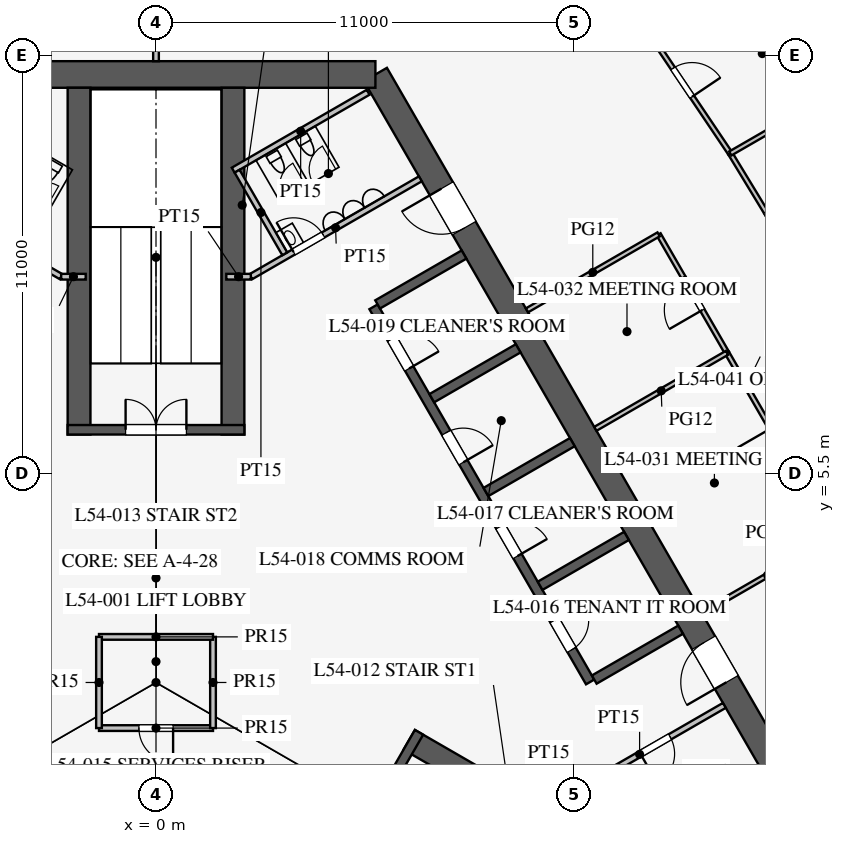
"""IFC4 building model, lengths in metres.
Left out: names, types, materials, properties, quantities, classifications, styles, units other than length and angle.
Written with IfcOpenShell. Run it as: python <this file> out.ifc"""

import sys

from ifc_helpers import new_model, si_unit, direction, frame, frame_2d, origin, place, context, subcontext, project, spatial, rectangle, extrude, element, fill, save


model = new_model("IFC4")
c1 = context("Model", 3, precision=1e-05, world=origin(), true_north=direction((0.0, 1.0)))
c2 = subcontext(c1, "Body", "Model", "MODEL_VIEW")
j1 = project(units=[si_unit("LENGTHUNIT", "METRE"), si_unit("PLANEANGLEUNIT", "RADIAN")], contexts=[c1])
p1 = place(None, origin())
s1 = spatial("IfcSite", under=j1, at=p1, CompositionType="ELEMENT")
p2 = place(p1, origin())
s2 = spatial("IfcBuilding", under=s1, at=p2, CompositionType="ELEMENT")
p3 = place(p2, frame((0.0, 0.0, 235.9)))
s3 = spatial("IfcBuildingStorey", under=s2, at=p3, CompositionType="ELEMENT", Elevation=235.9)
p4 = place(p3, frame((16.743, -3.0, 0.0), z_axis=(0.0, 0.0, 1.0), x_axis=(-0.500002442456, 0.866023993627, 0.0)))
e1 = element("IfcWall", 1, at=p4, inside=s3, PredefinedType="SHEAR", context=c2, shape_type="SweptSolid", body=[
    extrude(rectangle(XDim=21.939, YDim=0.7, at=frame_2d((10.97, 0.0))), origin(), (0.0, 0.0, 1.0), 4.2),
])
p5 = place(p4, frame((17.27, 0.0, 0.0)))
e2 = element("IfcOpeningElement", 2, at=p5, cuts=e1, PredefinedType="OPENING", context=c2, shape_type="SweptSolid", body=[
    extrude(rectangle(XDim=1.2, YDim=2.1, at=frame_2d((0.6, 1.05))), frame((0.0, 0.36, 0.0), z_axis=(0.0, -1.0, 0.0), x_axis=(1.0, 0.0, 0.0)), (0.0, 0.0, 1.0), 0.72),
])
p6 = place(p4, frame((3.47, 0.0, 0.0)))
e3 = element("IfcOpeningElement", 3, at=p6, cuts=e1, PredefinedType="OPENING", context=c2, shape_type="SweptSolid", body=[
    extrude(rectangle(XDim=1.2, YDim=2.1, at=frame_2d((0.6, 1.05))), frame((0.0, 0.36, 0.0), z_axis=(0.0, -1.0, 0.0), x_axis=(1.0, 0.0, 0.0)), (0.0, 0.0, 1.0), 0.72),
])
p7 = place(p3, frame((5.773, 16.0, 0.0), z_axis=(0.0, 0.0, 1.0), x_axis=(-1.0, 0.0, 0.0)))
e4 = element("IfcWall", 4, at=p7, inside=s3, PredefinedType="SHEAR", context=c2, shape_type="SweptSolid", body=[
    extrude(rectangle(XDim=11.547, YDim=0.7, at=frame_2d((5.773, 0.0))), origin(), (0.0, 0.0, 1.0), 4.2),
])
p8 = place(p3, frame((11.424, 0.014, 0.0), z_axis=(0.0, 0.0, 1.0), x_axis=(-0.500001763848, 0.866024385424, 0.0)))
e5 = element("IfcWall", 5, at=p8, inside=s3, PredefinedType="SHEAR", context=c2, shape_type="SweptSolid", body=[
    extrude(rectangle(XDim=11.4, YDim=0.25, at=frame_2d((5.7, 0.0))), origin(), (0.0, 0.0, 1.0), 4.2),
])
p9 = place(p8, frame((0.975, 0.0, 0.0)))
e6 = element("IfcOpeningElement", 6, at=p9, cuts=e5, PredefinedType="OPENING", context=c2, shape_type="SweptSolid", body=[
    extrude(rectangle(XDim=0.9, YDim=2.1, at=frame_2d((0.45, 1.05))), frame((0.0, 0.135, 0.0), z_axis=(0.0, -1.0, 0.0), x_axis=(1.0, 0.0, 0.0)), (0.0, 0.0, 1.0), 0.27),
])
p10 = place(p8, frame((3.825, 0.0, 0.0)))
e7 = element("IfcOpeningElement", 7, at=p10, cuts=e5, PredefinedType="OPENING", context=c2, shape_type="SweptSolid", body=[
    extrude(rectangle(XDim=0.9, YDim=2.1, at=frame_2d((0.45, 1.05))), frame((0.0, 0.135, 0.0), z_axis=(0.0, -1.0, 0.0), x_axis=(1.0, 0.0, 0.0)), (0.0, 0.0, 1.0), 0.27),
])
p11 = place(p8, frame((6.675, 0.0, 0.0)))
e8 = element("IfcOpeningElement", 8, at=p11, cuts=e5, PredefinedType="OPENING", context=c2, shape_type="SweptSolid", body=[
    extrude(rectangle(XDim=0.9, YDim=2.1, at=frame_2d((0.45, 1.05))), frame((0.0, 0.135, 0.0), z_axis=(0.0, -1.0, 0.0), x_axis=(1.0, 0.0, 0.0)), (0.0, 0.0, 1.0), 0.27),
])
p12 = place(p8, frame((9.525, 0.0, 0.0)))
e9 = element("IfcOpeningElement", 9, at=p12, cuts=e5, PredefinedType="OPENING", context=c2, shape_type="SweptSolid", body=[
    extrude(rectangle(XDim=0.9, YDim=2.1, at=frame_2d((0.45, 1.05))), frame((0.0, 0.135, 0.0), z_axis=(0.0, -1.0, 0.0), x_axis=(1.0, 0.0, 0.0)), (0.0, 0.0, 1.0), 0.27),
])
for number, where, z_axis, x_axis in (
    (10, (11.532, 0.076, 0.0), (0.0, 0.0, 1.0), (0.866, 0.5, 0.0)),
    (11, (10.107, 2.544, 0.0), (0.0, 0.0, 1.0), (0.866, 0.5, 0.0)),
    (12, (8.682, 5.012, 0.0), (0.0, 0.0, 1.0), (0.866, 0.5, 0.0)),
    (13, (7.257, 7.481, 0.0), (0.0, 0.0, 1.0), (0.866, 0.5, 0.0)),
    (14, (5.832, 9.949, 0.0), (0.0, 0.0, 1.0), (0.866, 0.5, 0.0)),
):
    element("IfcWall", number, at=place(p3, frame(where, z_axis=z_axis, x_axis=x_axis)), inside=s3, PredefinedType="SHEAR", context=c2, shape_type="SweptSolid", body=[
        extrude(rectangle(XDim=2.625, YDim=0.25, at=frame_2d((1.312, 0.0))), origin(), (0.0, 0.0, 1.0), 4.2),
    ])
p13 = place(p3, frame((6.663, -1.509, 0.0), z_axis=(0.0, 0.0, 1.0), x_axis=(0.866028310072, -0.499994966129, 0.0)))
e15 = element("IfcWall", 15, at=p13, inside=s3, PredefinedType="SHEAR", context=c2, shape_type="SweptSolid", body=[
    extrude(rectangle(XDim=9.125, YDim=0.6, at=frame_2d((4.562, 0.0))), origin(), (0.0, 0.0, 1.0), 4.2),
])
p14 = place(p3, frame((4.597, -5.339, 0.0), z_axis=(0.0, 0.0, 1.0), x_axis=(0.499984536904, 0.866034331223, 0.0)))
e16 = element("IfcWall", 16, at=p14, inside=s3, PredefinedType="SHEAR", context=c2, shape_type="SweptSolid", body=[
    extrude(rectangle(XDim=4.65, YDim=0.25, at=frame_2d((2.325, 0.0))), origin(), (0.0, 0.0, 1.0), 4.2),
])
p15 = place(p14, frame((1.525, 0.0, 0.0)))
e17 = element("IfcOpeningElement", 17, at=p15, cuts=e16, PredefinedType="OPENING", context=c2, shape_type="SweptSolid", body=[
    extrude(rectangle(XDim=1.6, YDim=2.1, at=frame_2d((0.8, 1.05))), frame((0.0, 0.135, 0.0), z_axis=(0.0, -1.0, 0.0), x_axis=(1.0, 0.0, 0.0)), (0.0, 0.0, 1.0), 0.27),
])
for number, where, z_axis, x_axis in (
    (18, (2.025, 6.525, 0.0), (0.0, 0.0, 1.0), (0.0, 1.0, 0.0)),
    (19, (-2.025, 6.525, 0.0), (0.0, 0.0, 1.0), (0.0, 1.0, 0.0)),
):
    element("IfcWall", number, at=place(p3, frame(where, z_axis=z_axis, x_axis=x_axis)), inside=s3, PredefinedType="SHEAR", context=c2, shape_type="SweptSolid", body=[
        extrude(rectangle(XDim=9.125, YDim=0.6, at=frame_2d((4.562, 0.0))), origin(), (0.0, 0.0, 1.0), 4.2),
    ])
p16 = place(p3, frame((2.325, 6.65, 0.0), z_axis=(0.0, 0.0, 1.0), x_axis=(-1.0, 0.0, 0.0)))
e20 = element("IfcWall", 20, at=p16, inside=s3, PredefinedType="SHEAR", context=c2, shape_type="SweptSolid", body=[
    extrude(rectangle(XDim=4.65, YDim=0.25, at=frame_2d((2.325, 0.0))), origin(), (0.0, 0.0, 1.0), 4.2),
])
p17 = place(p16, frame((1.525, 0.0, 0.0)))
e21 = element("IfcOpeningElement", 21, at=p17, cuts=e20, PredefinedType="OPENING", context=c2, shape_type="SweptSolid", body=[
    extrude(rectangle(XDim=1.6, YDim=2.1, at=frame_2d((0.8, 1.05))), frame((0.0, 0.135, 0.0), z_axis=(0.0, -1.0, 0.0), x_axis=(1.0, 0.0, 0.0)), (0.0, 0.0, 1.0), 0.27),
])
p18 = place(p3, frame((2.495, 10.678, 0.0), z_axis=(0.0, 0.0, 1.0), x_axis=(0.866037967349, 0.499978238636, 0.0)))
e22 = element("IfcWall", 22, at=p18, inside=s3, PredefinedType="PARTITIONING", context=c2, shape_type="SweptSolid", body=[
    extrude(rectangle(XDim=5.15, YDim=0.15, at=frame_2d((2.575, 0.0))), origin(), (0.0, 0.0, 1.0), 4.0),
])
p19 = place(p18, frame((1.3, 0.0, 0.0)))
e23 = element("IfcOpeningElement", 23, at=p19, cuts=e22, PredefinedType="OPENING", context=c2, shape_type="SweptSolid", body=[
    extrude(rectangle(XDim=0.9, YDim=2.1, at=frame_2d((0.45, 1.05))), frame((0.0, 0.085, 0.0), z_axis=(0.0, -1.0, 0.0), x_axis=(1.0, 0.0, 0.0)), (0.0, 0.0, 1.0), 0.17),
])
p20 = place(p3, frame((10.495, -3.178, 0.0), z_axis=(0.0, 0.0, 1.0), x_axis=(0.866037967349, 0.499978238636, 0.0)))
e24 = element("IfcWall", 24, at=p20, inside=s3, PredefinedType="PARTITIONING", context=c2, shape_type="SweptSolid", body=[
    extrude(rectangle(XDim=5.15, YDim=0.15, at=frame_2d((2.575, 0.0))), origin(), (0.0, 0.0, 1.0), 4.0),
])
p21 = place(p20, frame((2.6, 0.0, 0.0)))
e25 = element("IfcOpeningElement", 25, at=p21, cuts=e24, PredefinedType="OPENING", context=c2, shape_type="SweptSolid", body=[
    extrude(rectangle(XDim=0.9, YDim=2.1, at=frame_2d((0.45, 1.05))), frame((0.0, 0.085, 0.0), z_axis=(0.0, -1.0, 0.0), x_axis=(1.0, 0.0, 0.0)), (0.0, 0.0, 1.0), 0.17),
])
p22 = place(p3, frame((-2.495, 10.678, 0.0), z_axis=(0.0, 0.0, 1.0), x_axis=(-0.866037967349, 0.499978238636, 0.0)))
e26 = element("IfcWall", 26, at=p22, inside=s3, PredefinedType="PARTITIONING", context=c2, shape_type="SweptSolid", body=[
    extrude(rectangle(XDim=5.15, YDim=0.15, at=frame_2d((2.575, 0.0))), origin(), (0.0, 0.0, 1.0), 4.0),
])
p23 = place(p22, frame((2.6, 0.0, 0.0)))
e27 = element("IfcOpeningElement", 27, at=p23, cuts=e26, PredefinedType="OPENING", context=c2, shape_type="SweptSolid", body=[
    extrude(rectangle(XDim=0.9, YDim=2.1, at=frame_2d((0.45, 1.05))), frame((0.0, 0.085, 0.0), z_axis=(0.0, -1.0, 0.0), x_axis=(1.0, 0.0, 0.0)), (0.0, 0.0, 1.0), 0.17),
])
for number, where, z_axis, x_axis in (
    (28, (2.495, 10.678, 0.0), (0.0, 0.0, 1.0), (-1.0, 0.0, 0.0)),
    (29, (-2.495, 10.678, 0.0), (0.0, 0.0, 1.0), (1.0, 0.0, 0.0)),
):
    element("IfcWall", number, at=place(p3, frame(where, z_axis=z_axis, x_axis=x_axis)), inside=s3, PredefinedType="PARTITIONING", context=c2, shape_type="SweptSolid", body=[
        extrude(rectangle(XDim=0.645, YDim=0.15, at=frame_2d((0.323, 0.0))), origin(), (0.0, 0.0, 1.0), 4.0),
    ])
p24 = place(p3, frame((2.031, 13.482, 0.0), z_axis=(0.0, 0.0, 1.0), x_axis=(0.866050731258, 0.499956128963, 0.0)))
e30 = element("IfcWall", 30, at=p24, inside=s3, PredefinedType="PARTITIONING", context=c2, shape_type="SweptSolid", body=[
    extrude(rectangle(XDim=4.1, YDim=0.15, at=frame_2d((2.05, 0.0))), origin(), (0.0, 0.0, 1.0), 4.0),
])
p25 = place(p3, frame((3.389, 11.281, 0.0), z_axis=(0.0, 0.0, 1.0), x_axis=(-0.499989096993, 0.866031698547, 0.0)))
e31 = element("IfcWall", 31, at=p25, inside=s3, PredefinedType="PARTITIONING", context=c2, shape_type="SweptSolid", body=[
    extrude(rectangle(XDim=2.51, YDim=0.15, at=frame_2d((1.255, 0.0))), origin(), (0.0, 0.0, 1.0), 4.0),
])
p26 = place(p3, frame((-1.5, -1.2, 0.0), z_axis=(0.0, 0.0, 1.0), x_axis=(1.0, 0.0, 0.0)))
e32 = element("IfcWall", 32, at=p26, inside=s3, PredefinedType="PARTITIONING", context=c2, shape_type="SweptSolid", body=[
    extrude(rectangle(XDim=3.0, YDim=0.15, at=frame_2d((1.5, 0.0))), origin(), (0.0, 0.0, 1.0), 4.0),
])
p27 = place(p26, frame((1.05, 0.0, 0.0)))
e33 = element("IfcOpeningElement", 33, at=p27, cuts=e32, PredefinedType="OPENING", context=c2, shape_type="SweptSolid", body=[
    extrude(rectangle(XDim=0.9, YDim=2.1, at=frame_2d((0.45, 1.05))), frame((0.0, 0.085, 0.0), z_axis=(0.0, -1.0, 0.0), x_axis=(1.0, 0.0, 0.0)), (0.0, 0.0, 1.0), 0.17),
])
p28 = place(p3, frame((1.5, -1.2, 0.0), z_axis=(0.0, 0.0, 1.0), x_axis=(0.0, 1.0, 0.0)))
e34 = element("IfcWall", 34, at=p28, inside=s3, PredefinedType="PARTITIONING", context=c2, shape_type="SweptSolid", body=[
    extrude(rectangle(XDim=2.4, YDim=0.15, at=frame_2d((1.2, 0.0))), origin(), (0.0, 0.0, 1.0), 4.0),
])
p29 = place(p3, frame((1.5, 1.2, 0.0), z_axis=(0.0, 0.0, 1.0), x_axis=(-1.0, 0.0, 0.0)))
e35 = element("IfcWall", 35, at=p29, inside=s3, PredefinedType="PARTITIONING", context=c2, shape_type="SweptSolid", body=[
    extrude(rectangle(XDim=3.0, YDim=0.15, at=frame_2d((1.5, 0.0))), origin(), (0.0, 0.0, 1.0), 4.0),
])
p30 = place(p3, frame((-1.5, 1.2, 0.0), z_axis=(0.0, 0.0, 1.0), x_axis=(0.0, -1.0, 0.0)))
e36 = element("IfcWall", 36, at=p30, inside=s3, PredefinedType="PARTITIONING", context=c2, shape_type="SweptSolid", body=[
    extrude(rectangle(XDim=2.4, YDim=0.15, at=frame_2d((1.2, 0.0))), origin(), (0.0, 0.0, 1.0), 4.0),
])
p31 = place(p3, frame((0.0, 16.35, 0.0), z_axis=(0.0, 0.0, 1.0), x_axis=(0.0, 1.0, 0.0)))
e37 = element("IfcWall", 37, at=p31, inside=s3, PredefinedType="PARTITIONING", context=c2, shape_type="SweptSolid", body=[
    extrude(rectangle(XDim=15.0, YDim=0.15, at=frame_2d((7.5, 0.0))), origin(), (0.0, 0.0, 1.0), 2.4),
])
p32 = place(p3, frame((15.026, 8.675, 0.0), z_axis=(0.0, 0.0, 1.0), x_axis=(-0.500012057535, 0.866018442252, 0.0)))
e38 = element("IfcWall", 38, at=p32, inside=s3, PredefinedType="PARTITIONING", context=c2, shape_type="SweptSolid", body=[
    extrude(rectangle(XDim=3.6, YDim=0.12, at=frame_2d((1.8, 0.0))), origin(), (0.0, 0.0, 1.0), 2.9),
])
p33 = place(p32, frame((1.3, 0.0, 0.15)))
e39 = element("IfcOpeningElement", 39, at=p33, cuts=e38, PredefinedType="OPENING", context=c2, shape_type="SweptSolid", body=[
    extrude(rectangle(XDim=1.0, YDim=2.1, at=frame_2d((0.5, 1.05))), frame((0.0, 0.07, 0.0), z_axis=(0.0, -1.0, 0.0), x_axis=(1.0, 0.0, 0.0)), (0.0, 0.0, 1.0), 0.14),
])
p34 = place(p3, frame((17.825, 3.825, 0.0), z_axis=(0.0, 0.0, 1.0), x_axis=(-0.499965239061, 0.866045472092, 0.0)))
e40 = element("IfcWall", 40, at=p34, inside=s3, PredefinedType="PARTITIONING", context=c2, shape_type="SweptSolid", body=[
    extrude(rectangle(XDim=5.6, YDim=0.12, at=frame_2d((2.8, 0.0))), origin(), (0.0, 0.0, 1.0), 2.9),
])
p35 = place(p34, frame((2.3, 0.0, 0.15)))
e41 = element("IfcOpeningElement", 41, at=p35, cuts=e40, PredefinedType="OPENING", context=c2, shape_type="SweptSolid", body=[
    extrude(rectangle(XDim=1.0, YDim=2.1, at=frame_2d((0.5, 1.05))), frame((0.0, 0.07, 0.0), z_axis=(0.0, -1.0, 0.0), x_axis=(1.0, 0.0, 0.0)), (0.0, 0.0, 1.0), 0.14),
])
for number, where, z_axis, x_axis in (
    (42, (9.761, 9.793, 0.0), (0.0, 0.0, 1.0), (0.866, 0.5, 0.0)),
    (43, (11.562, 6.675, 0.0), (0.0, 0.0, 1.0), (0.866, 0.5, 0.0)),
    (44, (14.361, 1.825, 0.0), (0.0, 0.0, 1.0), (0.866, 0.5, 0.0)),
):
    element("IfcWall", number, at=place(p3, frame(where, z_axis=z_axis, x_axis=x_axis)), inside=s3, PredefinedType="PARTITIONING", context=c2, shape_type="SweptSolid", body=[
        extrude(rectangle(XDim=4.0, YDim=0.12, at=frame_2d((2.0, 0.0))), origin(), (0.0, 0.0, 1.0), 2.9),
    ])
p36 = place(p3, frame((17.451, 10.075, 0.0), z_axis=(0.0, 0.0, 1.0), x_axis=(-0.519790350351, 0.85429385558, 0.0)))
e45 = element("IfcWall", 45, at=p36, inside=s3, PredefinedType="PARTITIONING", context=c2, shape_type="SweptSolid", body=[
    extrude(rectangle(XDim=4.501, YDim=0.12, at=frame_2d((2.25, 0.0))), origin(), (0.0, 0.0, 1.0), 2.9),
])
p37 = place(p36, frame((1.8, 0.0, 0.15)))
e46 = element("IfcOpeningElement", 46, at=p37, cuts=e45, PredefinedType="OPENING", context=c2, shape_type="SweptSolid", body=[
    extrude(rectangle(XDim=0.9, YDim=2.1, at=frame_2d((0.45, 1.05))), frame((0.0, 0.07, 0.0), z_axis=(0.0, -1.0, 0.0), x_axis=(1.0, 0.0, 0.0)), (0.0, 0.0, 1.0), 0.14),
])
p38 = place(p3, frame((15.111, 13.921, 0.0), z_axis=(0.0, 0.0, 1.0), x_axis=(-0.558466624917, 0.829526991034, 0.0)))
e47 = element("IfcWall", 47, at=p38, inside=s3, PredefinedType="PARTITIONING", context=c2, shape_type="SweptSolid", body=[
    extrude(rectangle(XDim=4.511, YDim=0.12, at=frame_2d((2.255, 0.0))), origin(), (0.0, 0.0, 1.0), 2.9),
])
p39 = place(p38, frame((1.8, 0.0, 0.15)))
e48 = element("IfcOpeningElement", 48, at=p39, cuts=e47, PredefinedType="OPENING", context=c2, shape_type="SweptSolid", body=[
    extrude(rectangle(XDim=0.9, YDim=2.1, at=frame_2d((0.45, 1.05))), frame((0.0, 0.07, 0.0), z_axis=(0.0, -1.0, 0.0), x_axis=(1.0, 0.0, 0.0)), (0.0, 0.0, 1.0), 0.14),
])
p40 = place(p3, frame((15.111, 13.921, 0.0), z_axis=(0.0, 0.0, 1.0), x_axis=(0.866032721818, 0.499987324581, 0.0)))
e49 = element("IfcWall", 49, at=p40, inside=s3, PredefinedType="PARTITIONING", context=c2, shape_type="SweptSolid", body=[
    extrude(rectangle(XDim=3.644, YDim=0.12, at=frame_2d((1.822, 0.0))), origin(), (0.0, 0.0, 1.0), 2.9),
])
p41 = place(p19, origin())
e50 = element("IfcDoor", 50, at=p41, inside=s3, OperationType="SINGLE_SWING_LEFT", PredefinedType="DOOR", context=c2, shape_type="SweptSolid", body=[
    extrude(rectangle(XDim=0.9, YDim=2.1, at=frame_2d((0.45, 1.05))), frame((0.0, 0.025, 0.0), z_axis=(0.0, -1.0, 0.0), x_axis=(1.0, 0.0, 0.0)), (0.0, 0.0, 1.0), 0.05),
])
fill(e23, e50)
p42 = place(p21, frame((0.9, 0.0, 0.0), z_axis=(0.0, 0.0, 1.0), x_axis=(-1.0, 0.0, 0.0)))
e51 = element("IfcDoor", 51, at=p42, inside=s3, OperationType="SINGLE_SWING_RIGHT", PredefinedType="DOOR", context=c2, shape_type="SweptSolid", body=[
    extrude(rectangle(XDim=0.9, YDim=2.1, at=frame_2d((0.45, 1.05))), frame((0.0, 0.025, 0.0), z_axis=(0.0, -1.0, 0.0), x_axis=(1.0, 0.0, 0.0)), (0.0, 0.0, 1.0), 0.05),
])
fill(e25, e51)
p43 = place(p27, frame((0.9, 0.0, 0.0), z_axis=(0.0, 0.0, 1.0), x_axis=(-1.0, 0.0, 0.0)))
e52 = element("IfcDoor", 52, at=p43, inside=s3, OperationType="SINGLE_SWING_LEFT", PredefinedType="DOOR", context=c2, shape_type="SweptSolid", body=[
    extrude(rectangle(XDim=0.9, YDim=2.1, at=frame_2d((0.45, 1.05))), frame((0.0, 0.025, 0.0), z_axis=(0.0, -1.0, 0.0), x_axis=(1.0, 0.0, 0.0)), (0.0, 0.0, 1.0), 0.05),
])
fill(e33, e52)
p44 = place(p17, frame((1.6, 0.0, 0.0), z_axis=(0.0, 0.0, 1.0), x_axis=(-1.0, 0.0, 0.0)))
e53 = element("IfcDoor", 53, at=p44, inside=s3, OperationType="DOUBLE_DOOR_SINGLE_SWING", PredefinedType="DOOR", context=c2, shape_type="SweptSolid", body=[
    extrude(rectangle(XDim=1.6, YDim=2.1, at=frame_2d((0.8, 1.05))), frame((0.0, 0.025, 0.0), z_axis=(0.0, -1.0, 0.0), x_axis=(1.0, 0.0, 0.0)), (0.0, 0.0, 1.0), 0.05),
])
fill(e21, e53)
p45 = place(p5, origin())
e54 = element("IfcDoor", 54, at=p45, inside=s3, OperationType="SINGLE_SWING_RIGHT", PredefinedType="DOOR", context=c2, shape_type="SweptSolid", body=[
    extrude(rectangle(XDim=1.2, YDim=2.1, at=frame_2d((0.6, 1.05))), frame((0.0, 0.025, 0.0), z_axis=(0.0, -1.0, 0.0), x_axis=(1.0, 0.0, 0.0)), (0.0, 0.0, 1.0), 0.05),
])
fill(e2, e54)
p46 = place(p6, origin())
e55 = element("IfcDoor", 55, at=p46, inside=s3, OperationType="SINGLE_SWING_LEFT", PredefinedType="DOOR", context=c2, shape_type="SweptSolid", body=[
    extrude(rectangle(XDim=1.2, YDim=2.1, at=frame_2d((0.6, 1.05))), frame((0.0, 0.025, 0.0), z_axis=(0.0, -1.0, 0.0), x_axis=(1.0, 0.0, 0.0)), (0.0, 0.0, 1.0), 0.05),
])
fill(e3, e55)
p47 = place(p9, frame((0.9, 0.0, 0.0), z_axis=(0.0, 0.0, 1.0), x_axis=(-1.0, 0.0, 0.0)))
e56 = element("IfcDoor", 56, at=p47, inside=s3, OperationType="SINGLE_SWING_LEFT", PredefinedType="DOOR", context=c2, shape_type="SweptSolid", body=[
    extrude(rectangle(XDim=0.9, YDim=2.1, at=frame_2d((0.45, 1.05))), frame((0.0, 0.025, 0.0), z_axis=(0.0, -1.0, 0.0), x_axis=(1.0, 0.0, 0.0)), (0.0, 0.0, 1.0), 0.05),
])
fill(e6, e56)
p48 = place(p10, frame((0.9, 0.0, 0.0), z_axis=(0.0, 0.0, 1.0), x_axis=(-1.0, 0.0, 0.0)))
e57 = element("IfcDoor", 57, at=p48, inside=s3, OperationType="SINGLE_SWING_RIGHT", PredefinedType="DOOR", context=c2, shape_type="SweptSolid", body=[
    extrude(rectangle(XDim=0.9, YDim=2.1, at=frame_2d((0.45, 1.05))), frame((0.0, 0.025, 0.0), z_axis=(0.0, -1.0, 0.0), x_axis=(1.0, 0.0, 0.0)), (0.0, 0.0, 1.0), 0.05),
])
fill(e7, e57)
p49 = place(p11, frame((0.9, 0.0, 0.0), z_axis=(0.0, 0.0, 1.0), x_axis=(-1.0, 0.0, 0.0)))
e58 = element("IfcDoor", 58, at=p49, inside=s3, OperationType="SINGLE_SWING_RIGHT", PredefinedType="DOOR", context=c2, shape_type="SweptSolid", body=[
    extrude(rectangle(XDim=0.9, YDim=2.1, at=frame_2d((0.45, 1.05))), frame((0.0, 0.025, 0.0), z_axis=(0.0, -1.0, 0.0), x_axis=(1.0, 0.0, 0.0)), (0.0, 0.0, 1.0), 0.05),
])
fill(e8, e58)
p50 = place(p12, frame((0.9, 0.0, 0.0), z_axis=(0.0, 0.0, 1.0), x_axis=(-1.0, 0.0, 0.0)))
e59 = element("IfcDoor", 59, at=p50, inside=s3, OperationType="SINGLE_SWING_RIGHT", PredefinedType="DOOR", context=c2, shape_type="SweptSolid", body=[
    extrude(rectangle(XDim=0.9, YDim=2.1, at=frame_2d((0.45, 1.05))), frame((0.0, 0.025, 0.0), z_axis=(0.0, -1.0, 0.0), x_axis=(1.0, 0.0, 0.0)), (0.0, 0.0, 1.0), 0.05),
])
fill(e9, e59)
p51 = place(p33, origin())
e60 = element("IfcDoor", 60, at=p51, inside=s3, OperationType="SINGLE_SWING_LEFT", PredefinedType="DOOR", context=c2, shape_type="SweptSolid", body=[
    extrude(rectangle(XDim=1.0, YDim=2.1, at=frame_2d((0.5, 1.05))), frame((0.0, 0.025, 0.0), z_axis=(0.0, -1.0, 0.0), x_axis=(1.0, 0.0, 0.0)), (0.0, 0.0, 1.0), 0.05),
])
fill(e39, e60)
p52 = place(p39, frame((0.9, 0.0, 0.0), z_axis=(0.0, 0.0, 1.0), x_axis=(-1.0, 0.0, 0.0)))
e61 = element("IfcDoor", 61, at=p52, inside=s3, OperationType="SINGLE_SWING_RIGHT", PredefinedType="DOOR", context=c2, shape_type="SweptSolid", body=[
    extrude(rectangle(XDim=0.9, YDim=2.1, at=frame_2d((0.45, 1.05))), frame((0.0, 0.025, 0.0), z_axis=(0.0, -1.0, 0.0), x_axis=(1.0, 0.0, 0.0)), (0.0, 0.0, 1.0), 0.05),
])
fill(e48, e61)
save(model, sys.argv[1])
